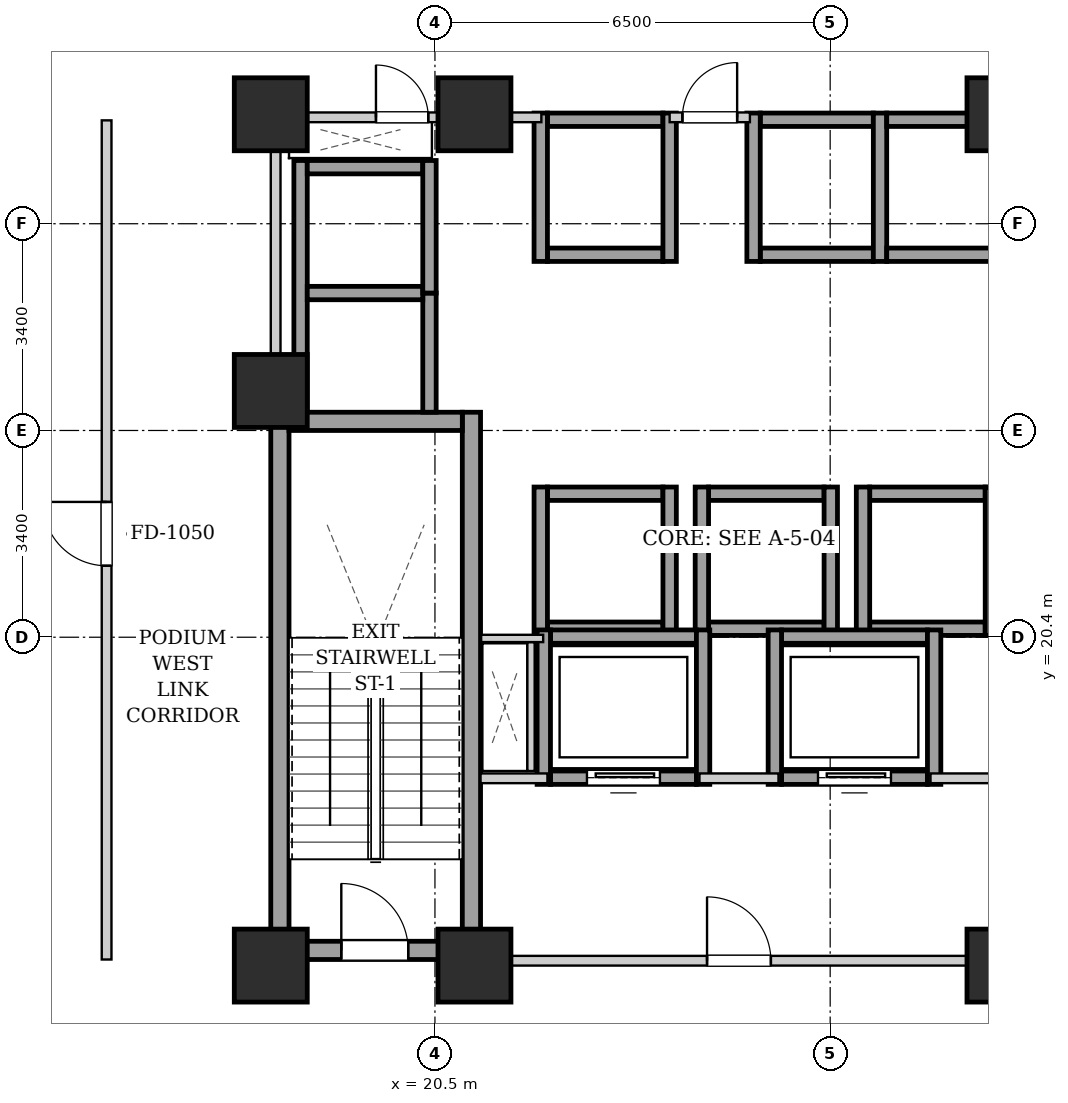
"""IFC4 building model, lengths in metres.
Left out: names, types, materials, properties, quantities, classifications, styles, units other than length and angle.
Written with IfcOpenShell. Run it as: python <this file> out.ifc"""

import sys

from ifc_helpers import new_model, si_unit, direction, frame, frame_2d, origin, origin_2d, place, context, subcontext, project, spatial, rectangle, extrude, element, fill, save


model = new_model("IFC4")
c1 = context("Model", 3, precision=1e-05, world=origin(), true_north=direction((0.0, 1.0)))
c2 = subcontext(c1, "Body", "Model", "MODEL_VIEW")
j1 = project(units=[si_unit("LENGTHUNIT", "METRE"), si_unit("PLANEANGLEUNIT", "RADIAN")], contexts=[c1])
p1 = place(None, origin())
s1 = spatial("IfcSite", under=j1, at=p1, CompositionType="ELEMENT")
p2 = place(p1, origin())
s2 = spatial("IfcBuilding", under=s1, at=p2, CompositionType="ELEMENT")
p3 = place(p2, frame((0.0, 0.0, 16.0)))
s3 = spatial("IfcBuildingStorey", under=s2, at=p3, CompositionType="ELEMENT", Elevation=16.0)
for number, where, z_axis, x_axis in (
    (1, (17.8, 15.0, 0.0), (0.0, 0.0, 1.0), (1.0, 0.0, 0.0)),
    (2, (21.15, 15.0, 0.0), (0.0, 0.0, 1.0), (1.0, 0.0, 0.0)),
    (3, (29.85, 15.0, 0.0), (0.0, 0.0, 1.0), (1.0, 0.0, 0.0)),
    (4, (17.8, 29.0, 0.0), (0.0, 0.0, 1.0), (1.0, 0.0, 0.0)),
    (5, (21.15, 29.0, 0.0), (0.0, 0.0, 1.0), (1.0, 0.0, 0.0)),
    (6, (29.85, 29.0, 0.0), (0.0, 0.0, 1.0), (1.0, 0.0, 0.0)),
    (7, (17.8, 24.45, 0.0), (0.0, 0.0, 1.0), (1.0, 0.0, 0.0)),
):
    element("IfcColumn", number, at=place(p3, frame(where, z_axis=z_axis, x_axis=x_axis)), inside=s3, PredefinedType="COLUMN", context=c2, shape_type="SweptSolid", body=[
        extrude(rectangle(XDim=1.2, YDim=1.2, at=origin_2d()), origin(), (0.0, 0.0, 1.0), 4.8),
    ])
for number, where, z_axis, x_axis in (
    (8, (17.95, 15.1, 0.0), (0.0, 0.0, 1.0), (0.0, 1.0, 0.0)),
    (9, (21.1, 15.1, 0.0), (0.0, 0.0, 1.0), (0.0, 1.0, 0.0)),
):
    element("IfcWall", number, at=place(p3, frame(where, z_axis=z_axis, x_axis=x_axis)), inside=s3, PredefinedType="SHEAR", context=c2, shape_type="SweptSolid", body=[
        extrude(rectangle(XDim=9.0, YDim=0.3, at=frame_2d((4.5, 0.0))), origin(), (0.0, 0.0, 1.0), 4.35),
    ])
p4 = place(p3, frame((18.1, 23.95, 0.0), z_axis=(0.0, 0.0, 1.0), x_axis=(1.0, 0.0, 0.0)))
e10 = element("IfcWall", 10, at=p4, inside=s3, PredefinedType="SHEAR", context=c2, shape_type="SweptSolid", body=[
    extrude(rectangle(XDim=2.85, YDim=0.3, at=frame_2d((1.425, 0.0))), origin(), (0.0, 0.0, 1.0), 4.35),
])
p5 = place(p3, frame((18.1, 15.25, 0.0), z_axis=(0.0, 0.0, 1.0), x_axis=(1.0, 0.0, 0.0)))
e11 = element("IfcWall", 11, at=p5, inside=s3, PredefinedType="SHEAR", context=c2, shape_type="SweptSolid", body=[
    extrude(rectangle(XDim=2.85, YDim=0.3, at=frame_2d((1.425, 0.0))), origin(), (0.0, 0.0, 1.0), 4.35),
])
p6 = place(p5, frame((0.86, 0.0, 0.0)))
e12 = element("IfcOpeningElement", 12, at=p6, cuts=e11, PredefinedType="OPENING", context=c2, shape_type="SweptSolid", body=[
    extrude(rectangle(XDim=1.1, YDim=2.05, at=frame_2d((0.55, 1.025))), frame((0.0, 0.16, 0.0), z_axis=(0.0, -1.0, 0.0), x_axis=(1.0, 0.0, 0.0)), (0.0, 0.0, 1.0), 0.32),
])
for number, where, z_axis, x_axis in (
    (13, (22.35, 26.69, 0.0), (0.0, 0.0, 1.0), (1.0, 0.0, 0.0)),
    (14, (22.35, 28.91, 0.0), (0.0, 0.0, 1.0), (1.0, 0.0, 0.0)),
):
    element("IfcWall", number, at=place(p3, frame(where, z_axis=z_axis, x_axis=x_axis)), inside=s3, PredefinedType="SHEAR", context=c2, shape_type="SweptSolid", body=[
        extrude(rectangle(XDim=1.9, YDim=0.22, at=frame_2d((0.95, 0.0))), origin(), (0.0, 0.0, 1.0), 4.35),
    ])
for number, where, z_axis, x_axis in (
    (15, (22.24, 26.58, 0.0), (0.0, 0.0, 1.0), (0.0, 1.0, 0.0)),
    (16, (24.36, 26.58, 0.0), (0.0, 0.0, 1.0), (0.0, 1.0, 0.0)),
):
    element("IfcWall", number, at=place(p3, frame(where, z_axis=z_axis, x_axis=x_axis)), inside=s3, PredefinedType="SHEAR", context=c2, shape_type="SweptSolid", body=[
        extrude(rectangle(XDim=2.44, YDim=0.22, at=frame_2d((1.22, 0.0))), origin(), (0.0, 0.0, 1.0), 4.35),
    ])
for number, where, z_axis, x_axis in (
    (17, (25.85, 26.69, 0.0), (0.0, 0.0, 1.0), (1.0, 0.0, 0.0)),
    (18, (25.85, 28.91, 0.0), (0.0, 0.0, 1.0), (1.0, 0.0, 0.0)),
):
    element("IfcWall", number, at=place(p3, frame(where, z_axis=z_axis, x_axis=x_axis)), inside=s3, PredefinedType="SHEAR", context=c2, shape_type="SweptSolid", body=[
        extrude(rectangle(XDim=1.86, YDim=0.22, at=frame_2d((0.93, 0.0))), origin(), (0.0, 0.0, 1.0), 4.35),
    ])
for number, where, z_axis, x_axis in (
    (19, (25.74, 26.58, 0.0), (0.0, 0.0, 1.0), (0.0, 1.0, 0.0)),
    (20, (27.82, 26.58, 0.0), (0.0, 0.0, 1.0), (0.0, 1.0, 0.0)),
):
    element("IfcWall", number, at=place(p3, frame(where, z_axis=z_axis, x_axis=x_axis)), inside=s3, PredefinedType="SHEAR", context=c2, shape_type="SweptSolid", body=[
        extrude(rectangle(XDim=2.44, YDim=0.22, at=frame_2d((1.22, 0.0))), origin(), (0.0, 0.0, 1.0), 4.35),
    ])
for number, where, z_axis, x_axis in (
    (21, (27.93, 26.69, 0.0), (0.0, 0.0, 1.0), (1.0, 0.0, 0.0)),
    (22, (27.93, 28.91, 0.0), (0.0, 0.0, 1.0), (1.0, 0.0, 0.0)),
):
    element("IfcWall", number, at=place(p3, frame(where, z_axis=z_axis, x_axis=x_axis)), inside=s3, PredefinedType="SHEAR", context=c2, shape_type="SweptSolid", body=[
        extrude(rectangle(XDim=1.86, YDim=0.22, at=frame_2d((0.93, 0.0))), origin(), (0.0, 0.0, 1.0), 4.35),
    ])
for number, where, z_axis, x_axis in (
    (23, (22.35, 20.54, 0.0), (0.0, 0.0, 1.0), (1.0, 0.0, 0.0)),
    (24, (22.35, 22.76, 0.0), (0.0, 0.0, 1.0), (1.0, 0.0, 0.0)),
):
    element("IfcWall", number, at=place(p3, frame(where, z_axis=z_axis, x_axis=x_axis)), inside=s3, PredefinedType="SHEAR", context=c2, shape_type="SweptSolid", body=[
        extrude(rectangle(XDim=1.9, YDim=0.22, at=frame_2d((0.95, 0.0))), origin(), (0.0, 0.0, 1.0), 4.35),
    ])
for number, where, z_axis, x_axis in (
    (25, (22.24, 20.43, 0.0), (0.0, 0.0, 1.0), (0.0, 1.0, 0.0)),
    (26, (24.36, 20.43, 0.0), (0.0, 0.0, 1.0), (0.0, 1.0, 0.0)),
):
    element("IfcWall", number, at=place(p3, frame(where, z_axis=z_axis, x_axis=x_axis)), inside=s3, PredefinedType="SHEAR", context=c2, shape_type="SweptSolid", body=[
        extrude(rectangle(XDim=2.44, YDim=0.22, at=frame_2d((1.22, 0.0))), origin(), (0.0, 0.0, 1.0), 4.35),
    ])
for number, where, z_axis, x_axis in (
    (27, (25.0, 20.54, 0.0), (0.0, 0.0, 1.0), (1.0, 0.0, 0.0)),
    (28, (25.0, 22.76, 0.0), (0.0, 0.0, 1.0), (1.0, 0.0, 0.0)),
):
    element("IfcWall", number, at=place(p3, frame(where, z_axis=z_axis, x_axis=x_axis)), inside=s3, PredefinedType="SHEAR", context=c2, shape_type="SweptSolid", body=[
        extrude(rectangle(XDim=1.9, YDim=0.22, at=frame_2d((0.95, 0.0))), origin(), (0.0, 0.0, 1.0), 4.35),
    ])
for number, where, z_axis, x_axis in (
    (29, (24.89, 20.43, 0.0), (0.0, 0.0, 1.0), (0.0, 1.0, 0.0)),
    (30, (27.01, 20.43, 0.0), (0.0, 0.0, 1.0), (0.0, 1.0, 0.0)),
):
    element("IfcWall", number, at=place(p3, frame(where, z_axis=z_axis, x_axis=x_axis)), inside=s3, PredefinedType="SHEAR", context=c2, shape_type="SweptSolid", body=[
        extrude(rectangle(XDim=2.44, YDim=0.22, at=frame_2d((1.22, 0.0))), origin(), (0.0, 0.0, 1.0), 4.35),
    ])
for number, where, z_axis, x_axis in (
    (31, (27.65, 20.54, 0.0), (0.0, 0.0, 1.0), (1.0, 0.0, 0.0)),
    (32, (27.65, 22.76, 0.0), (0.0, 0.0, 1.0), (1.0, 0.0, 0.0)),
):
    element("IfcWall", number, at=place(p3, frame(where, z_axis=z_axis, x_axis=x_axis)), inside=s3, PredefinedType="SHEAR", context=c2, shape_type="SweptSolid", body=[
        extrude(rectangle(XDim=1.9, YDim=0.22, at=frame_2d((0.95, 0.0))), origin(), (0.0, 0.0, 1.0), 4.35),
    ])
for number, where, z_axis, x_axis in (
    (33, (27.54, 20.43, 0.0), (0.0, 0.0, 1.0), (0.0, 1.0, 0.0)),
    (34, (29.66, 20.43, 0.0), (0.0, 0.0, 1.0), (0.0, 1.0, 0.0)),
):
    element("IfcWall", number, at=place(p3, frame(where, z_axis=z_axis, x_axis=x_axis)), inside=s3, PredefinedType="SHEAR", context=c2, shape_type="SweptSolid", body=[
        extrude(rectangle(XDim=2.44, YDim=0.22, at=frame_2d((1.22, 0.0))), origin(), (0.0, 0.0, 1.0), 4.35),
    ])
p7 = place(p3, frame((18.29, 24.1, 0.0), z_axis=(0.0, 0.0, 1.0), x_axis=(0.0, 1.0, 0.0)))
e35 = element("IfcWall", 35, at=p7, inside=s3, PredefinedType="SHEAR", context=c2, shape_type="SweptSolid", body=[
    extrude(rectangle(XDim=4.14, YDim=0.22, at=frame_2d((2.07, 0.0))), origin(), (0.0, 0.0, 1.0), 4.35),
])
p8 = place(p3, frame((20.41, 24.1, 0.0), z_axis=(0.0, 0.0, 1.0), x_axis=(0.0, 1.0, 0.0)))
e36 = element("IfcWall", 36, at=p8, inside=s3, PredefinedType="SHEAR", context=c2, shape_type="SweptSolid", body=[
    extrude(rectangle(XDim=1.96, YDim=0.22, at=frame_2d((0.98, 0.0))), origin(), (0.0, 0.0, 1.0), 4.35),
])
for number, where, z_axis, x_axis in (
    (37, (18.4, 26.06, 0.0), (0.0, 0.0, 1.0), (1.0, 0.0, 0.0)),
    (38, (18.4, 28.13, 0.0), (0.0, 0.0, 1.0), (1.0, 0.0, 0.0)),
):
    element("IfcWall", number, at=place(p3, frame(where, z_axis=z_axis, x_axis=x_axis)), inside=s3, PredefinedType="SHEAR", context=c2, shape_type="SweptSolid", body=[
        extrude(rectangle(XDim=1.9, YDim=0.22, at=frame_2d((0.95, 0.0))), origin(), (0.0, 0.0, 1.0), 4.35),
    ])
p9 = place(p3, frame((20.41, 26.06, 0.0), z_axis=(0.0, 0.0, 1.0), x_axis=(0.0, 1.0, 0.0)))
e39 = element("IfcWall", 39, at=p9, inside=s3, PredefinedType="SHEAR", context=c2, shape_type="SweptSolid", body=[
    extrude(rectangle(XDim=2.18, YDim=0.22, at=frame_2d((1.09, 0.0))), origin(), (0.0, 0.0, 1.0), 4.35),
])
p10 = place(p3, frame((22.4, 18.09, 0.0), z_axis=(0.0, 0.0, 1.0), x_axis=(1.0, 0.0, 0.0)))
e40 = element("IfcWall", 40, at=p10, inside=s3, PredefinedType="SHEAR", context=c2, shape_type="SweptSolid", body=[
    extrude(rectangle(XDim=2.4, YDim=0.22, at=frame_2d((1.2, 0.0))), origin(), (0.0, 0.0, 1.0), 4.35),
])
p11 = place(p10, frame((0.6, 0.0, 0.0)))
e41 = element("IfcOpeningElement", 41, at=p11, cuts=e40, PredefinedType="OPENING", context=c2, shape_type="SweptSolid", body=[
    extrude(rectangle(XDim=1.2, YDim=2.15, at=frame_2d((0.6, 1.075))), frame((0.0, 0.12, 0.0), z_axis=(0.0, -1.0, 0.0), x_axis=(1.0, 0.0, 0.0)), (0.0, 0.0, 1.0), 0.24),
])
p12 = place(p3, frame((22.4, 20.41, 0.0), z_axis=(0.0, 0.0, 1.0), x_axis=(1.0, 0.0, 0.0)))
e42 = element("IfcWall", 42, at=p12, inside=s3, PredefinedType="SHEAR", context=c2, shape_type="SweptSolid", body=[
    extrude(rectangle(XDim=2.4, YDim=0.22, at=frame_2d((1.2, 0.0))), origin(), (0.0, 0.0, 1.0), 4.35),
])
for number, where, z_axis, x_axis in (
    (43, (22.29, 17.98, 0.0), (0.0, 0.0, 1.0), (0.0, 1.0, 0.0)),
    (44, (24.91, 17.98, 0.0), (0.0, 0.0, 1.0), (0.0, 1.0, 0.0)),
):
    element("IfcWall", number, at=place(p3, frame(where, z_axis=z_axis, x_axis=x_axis)), inside=s3, PredefinedType="SHEAR", context=c2, shape_type="SweptSolid", body=[
        extrude(rectangle(XDim=2.54, YDim=0.22, at=frame_2d((1.27, 0.0))), origin(), (0.0, 0.0, 1.0), 4.35),
    ])
p13 = place(p3, frame((26.2, 18.09, 0.0), z_axis=(0.0, 0.0, 1.0), x_axis=(1.0, 0.0, 0.0)))
e45 = element("IfcWall", 45, at=p13, inside=s3, PredefinedType="SHEAR", context=c2, shape_type="SweptSolid", body=[
    extrude(rectangle(XDim=2.4, YDim=0.22, at=frame_2d((1.2, 0.0))), origin(), (0.0, 0.0, 1.0), 4.35),
])
p14 = place(p13, frame((0.6, 0.0, 0.0)))
e46 = element("IfcOpeningElement", 46, at=p14, cuts=e45, PredefinedType="OPENING", context=c2, shape_type="SweptSolid", body=[
    extrude(rectangle(XDim=1.2, YDim=2.15, at=frame_2d((0.6, 1.075))), frame((0.0, 0.12, 0.0), z_axis=(0.0, -1.0, 0.0), x_axis=(1.0, 0.0, 0.0)), (0.0, 0.0, 1.0), 0.24),
])
p15 = place(p3, frame((26.2, 20.41, 0.0), z_axis=(0.0, 0.0, 1.0), x_axis=(1.0, 0.0, 0.0)))
e47 = element("IfcWall", 47, at=p15, inside=s3, PredefinedType="SHEAR", context=c2, shape_type="SweptSolid", body=[
    extrude(rectangle(XDim=2.4, YDim=0.22, at=frame_2d((1.2, 0.0))), origin(), (0.0, 0.0, 1.0), 4.35),
])
for number, where, z_axis, x_axis in (
    (48, (26.09, 17.98, 0.0), (0.0, 0.0, 1.0), (0.0, 1.0, 0.0)),
    (49, (28.71, 17.98, 0.0), (0.0, 0.0, 1.0), (0.0, 1.0, 0.0)),
):
    element("IfcWall", number, at=place(p3, frame(where, z_axis=z_axis, x_axis=x_axis)), inside=s3, PredefinedType="SHEAR", context=c2, shape_type="SweptSolid", body=[
        extrude(rectangle(XDim=2.54, YDim=0.22, at=frame_2d((1.27, 0.0))), origin(), (0.0, 0.0, 1.0), 4.35),
    ])
p16 = place(p3, frame((21.25, 15.08, 0.0), z_axis=(0.0, 0.0, 1.0), x_axis=(1.0, 0.0, 0.0)))
e50 = element("IfcWall", 50, at=p16, inside=s3, PredefinedType="PARTITIONING", context=c2, shape_type="SweptSolid", body=[
    extrude(rectangle(XDim=8.5, YDim=0.16, at=frame_2d((4.25, 0.0))), origin(), (0.0, 0.0, 1.0), 4.35),
])
p17 = place(p16, frame((3.725, 0.0, 0.0)))
e51 = element("IfcOpeningElement", 51, at=p17, cuts=e50, PredefinedType="OPENING", context=c2, shape_type="SweptSolid", body=[
    extrude(rectangle(XDim=1.05, YDim=2.05, at=frame_2d((0.525, 1.025))), frame((0.0, 0.09, 0.0), z_axis=(0.0, -1.0, 0.0), x_axis=(1.0, 0.0, 0.0)), (0.0, 0.0, 1.0), 0.18),
])
p18 = place(p3, frame((21.25, 18.08, 0.0), z_axis=(0.0, 0.0, 1.0), x_axis=(1.0, 0.0, 0.0)))
e52 = element("IfcWall", 52, at=p18, inside=s3, PredefinedType="PARTITIONING", context=c2, shape_type="SweptSolid", body=[
    extrude(rectangle(XDim=1.1, YDim=0.16, at=frame_2d((0.55, 0.0))), origin(), (0.0, 0.0, 1.0), 4.35),
])
p19 = place(p3, frame((24.85, 18.08, 0.0), z_axis=(0.0, 0.0, 1.0), x_axis=(1.0, 0.0, 0.0)))
e53 = element("IfcWall", 53, at=p19, inside=s3, PredefinedType="PARTITIONING", context=c2, shape_type="SweptSolid", body=[
    extrude(rectangle(XDim=1.3, YDim=0.16, at=frame_2d((0.65, 0.0))), origin(), (0.0, 0.0, 1.0), 4.35),
])
p20 = place(p3, frame((28.65, 18.08, 0.0), z_axis=(0.0, 0.0, 1.0), x_axis=(1.0, 0.0, 0.0)))
e54 = element("IfcWall", 54, at=p20, inside=s3, PredefinedType="PARTITIONING", context=c2, shape_type="SweptSolid", body=[
    extrude(rectangle(XDim=1.1, YDim=0.16, at=frame_2d((0.55, 0.0))), origin(), (0.0, 0.0, 1.0), 4.35),
])
p21 = place(p3, frame((17.88, 24.12, 0.0), z_axis=(0.0, 0.0, 1.0), x_axis=(0.0, 1.0, 0.0)))
e55 = element("IfcWall", 55, at=p21, inside=s3, PredefinedType="PARTITIONING", context=c2, shape_type="SweptSolid", body=[
    extrude(rectangle(XDim=4.76, YDim=0.16, at=frame_2d((2.38, 0.0))), origin(), (0.0, 0.0, 1.0), 4.35),
])
p22 = place(p3, frame((24.36, 28.95, 0.0), z_axis=(0.0, 0.0, 1.0), x_axis=(1.0, 0.0, 0.0)))
e56 = element("IfcWall", 56, at=p22, inside=s3, PredefinedType="PARTITIONING", context=c2, shape_type="SweptSolid", body=[
    extrude(rectangle(XDim=1.32, YDim=0.16, at=frame_2d((0.66, 0.0))), origin(), (0.0, 0.0, 1.0), 4.35),
])
p23 = place(p22, frame((0.21, 0.0, 0.0)))
e57 = element("IfcOpeningElement", 57, at=p23, cuts=e56, PredefinedType="OPENING", context=c2, shape_type="SweptSolid", body=[
    extrude(rectangle(XDim=0.9, YDim=2.05, at=frame_2d((0.45, 1.025))), frame((0.0, 0.09, 0.0), z_axis=(0.0, -1.0, 0.0), x_axis=(1.0, 0.0, 0.0)), (0.0, 0.0, 1.0), 0.18),
])
p24 = place(p3, frame((17.96, 28.95, 0.0), z_axis=(0.0, 0.0, 1.0), x_axis=(1.0, 0.0, 0.0)))
e58 = element("IfcWall", 58, at=p24, inside=s3, PredefinedType="PARTITIONING", context=c2, shape_type="SweptSolid", body=[
    extrude(rectangle(XDim=4.29, YDim=0.16, at=frame_2d((2.145, 0.0))), origin(), (0.0, 0.0, 1.0), 4.35),
])
p25 = place(p24, frame((1.57, 0.0, 0.0)))
e59 = element("IfcOpeningElement", 59, at=p25, cuts=e58, PredefinedType="OPENING", context=c2, shape_type="SweptSolid", body=[
    extrude(rectangle(XDim=0.86, YDim=2.05, at=frame_2d((0.43, 1.025))), frame((0.0, 0.09, 0.0), z_axis=(0.0, -1.0, 0.0), x_axis=(1.0, 0.0, 0.0)), (0.0, 0.0, 1.0), 0.18),
])
p26 = place(p3, frame((22.08, 18.2, 0.0), z_axis=(0.0, 0.0, 1.0), x_axis=(0.0, 1.0, 0.0)))
e60 = element("IfcWall", 60, at=p26, inside=s3, PredefinedType="PARTITIONING", context=c2, shape_type="SweptSolid", body=[
    extrude(rectangle(XDim=2.12, YDim=0.12, at=frame_2d((1.06, 0.0))), origin(), (0.0, 0.0, 1.0), 4.35),
])
p27 = place(p3, frame((22.28, 20.38, 0.0), z_axis=(0.0, 0.0, 1.0), x_axis=(-1.0, 0.0, 0.0)))
e61 = element("IfcWall", 61, at=p27, inside=s3, PredefinedType="PARTITIONING", context=c2, shape_type="SweptSolid", body=[
    extrude(rectangle(XDim=1.02, YDim=0.12, at=frame_2d((0.51, 0.0))), origin(), (0.0, 0.0, 1.0), 4.35),
])
p28 = place(p3, frame((15.1, 15.1, 0.0), z_axis=(0.0, 0.0, 1.0), x_axis=(0.0, 1.0, 0.0)))
e62 = element("IfcWall", 62, at=p28, inside=s3, PredefinedType="PARTITIONING", context=c2, shape_type="SweptSolid", body=[
    extrude(rectangle(XDim=13.8, YDim=0.16, at=frame_2d((6.9, 0.0))), origin(), (0.0, 0.0, 1.0), 4.35),
])
p29 = place(p28, frame((6.475, 0.0, 0.0)))
e63 = element("IfcOpeningElement", 63, at=p29, cuts=e62, PredefinedType="OPENING", context=c2, shape_type="SweptSolid", body=[
    extrude(rectangle(XDim=1.05, YDim=2.05, at=frame_2d((0.525, 1.025))), frame((0.0, 0.09, 0.0), z_axis=(0.0, -1.0, 0.0), x_axis=(1.0, 0.0, 0.0)), (0.0, 0.0, 1.0), 0.18),
])
p30 = place(p6, origin())
e64 = element("IfcDoor", 64, at=p30, inside=s3, OperationType="SINGLE_SWING_LEFT", PredefinedType="DOOR", context=c2, shape_type="SweptSolid", body=[
    extrude(rectangle(XDim=1.1, YDim=2.05, at=frame_2d((0.55, 1.025))), frame((0.0, 0.025, 0.0), z_axis=(0.0, -1.0, 0.0), x_axis=(1.0, 0.0, 0.0)), (0.0, 0.0, 1.0), 0.05),
])
fill(e12, e64)
p31 = place(p11, origin())
e65 = element("IfcDoor", 65, at=p31, inside=s3, OperationType="SLIDING_TO_LEFT", PredefinedType="DOOR", context=c2, shape_type="SweptSolid", body=[
    extrude(rectangle(XDim=1.2, YDim=2.15, at=frame_2d((0.6, 1.075))), frame((0.0, 0.025, 0.0), z_axis=(0.0, -1.0, 0.0), x_axis=(1.0, 0.0, 0.0)), (0.0, 0.0, 1.0), 0.05),
])
fill(e41, e65)
p32 = place(p14, origin())
e66 = element("IfcDoor", 66, at=p32, inside=s3, OperationType="SLIDING_TO_LEFT", PredefinedType="DOOR", context=c2, shape_type="SweptSolid", body=[
    extrude(rectangle(XDim=1.2, YDim=2.15, at=frame_2d((0.6, 1.075))), frame((0.0, 0.025, 0.0), z_axis=(0.0, -1.0, 0.0), x_axis=(1.0, 0.0, 0.0)), (0.0, 0.0, 1.0), 0.05),
])
fill(e46, e66)
p33 = place(p17, origin())
e67 = element("IfcDoor", 67, at=p33, inside=s3, OperationType="SINGLE_SWING_LEFT", PredefinedType="DOOR", context=c2, shape_type="SweptSolid", body=[
    extrude(rectangle(XDim=1.05, YDim=2.05, at=frame_2d((0.525, 1.025))), frame((0.0, 0.025, 0.0), z_axis=(0.0, -1.0, 0.0), x_axis=(1.0, 0.0, 0.0)), (0.0, 0.0, 1.0), 0.05),
])
fill(e51, e67)
p34 = place(p23, origin())
e68 = element("IfcDoor", 68, at=p34, inside=s3, OperationType="SINGLE_SWING_RIGHT", PredefinedType="DOOR", context=c2, shape_type="SweptSolid", body=[
    extrude(rectangle(XDim=0.9, YDim=2.05, at=frame_2d((0.45, 1.025))), frame((0.0, 0.025, 0.0), z_axis=(0.0, -1.0, 0.0), x_axis=(1.0, 0.0, 0.0)), (0.0, 0.0, 1.0), 0.05),
])
fill(e57, e68)
p35 = place(p25, origin())
e69 = element("IfcDoor", 69, at=p35, inside=s3, OperationType="SINGLE_SWING_LEFT", PredefinedType="DOOR", context=c2, shape_type="SweptSolid", body=[
    extrude(rectangle(XDim=0.86, YDim=2.05, at=frame_2d((0.43, 1.025))), frame((0.0, 0.025, 0.0), z_axis=(0.0, -1.0, 0.0), x_axis=(1.0, 0.0, 0.0)), (0.0, 0.0, 1.0), 0.05),
])
fill(e59, e69)
p36 = place(p29, origin())
e70 = element("IfcDoor", 70, at=p36, inside=s3, OperationType="SINGLE_SWING_RIGHT", PredefinedType="DOOR", context=c2, shape_type="SweptSolid", body=[
    extrude(rectangle(XDim=1.05, YDim=2.05, at=frame_2d((0.525, 1.025))), frame((0.0, 0.025, 0.0), z_axis=(0.0, -1.0, 0.0), x_axis=(1.0, 0.0, 0.0)), (0.0, 0.0, 1.0), 0.05),
])
fill(e63, e70)
save(model, sys.argv[1])
